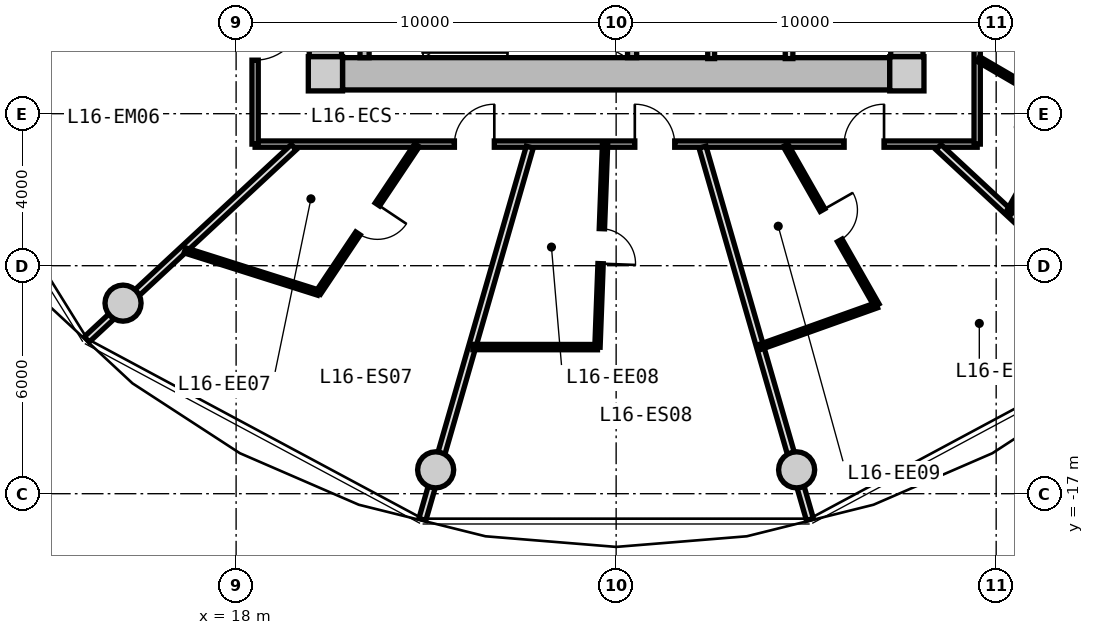
"""IFC4 building model, lengths in metres.
Left out: names, types, materials, properties, quantities, classifications, styles, units other than length and angle.
Written with IfcOpenShell. Run it as: python <this file> out.ifc"""

import sys

from ifc_helpers import new_model, si_unit, direction, frame, frame_2d, origin, origin_2d, place, context, subcontext, project, spatial, rectangle, circle, extrude, source, transform, mapped, element, fill, save


model = new_model("IFC4")
c1 = context("Model", 3, precision=1e-05, world=origin(), true_north=direction((0.0, 1.0)))
c2 = subcontext(c1, "Body", "Model", "MODEL_VIEW")
j1 = project(units=[si_unit("LENGTHUNIT", "METRE"), si_unit("PLANEANGLEUNIT", "RADIAN")], contexts=[c1])
p1 = place(None, origin())
s1 = spatial("IfcSite", under=j1, at=p1, CompositionType="ELEMENT")
p2 = place(p1, origin())
s2 = spatial("IfcBuilding", under=s1, at=p2, CompositionType="ELEMENT")
p3 = place(p2, frame((0.0, 0.0, 55.15)))
s3 = spatial("IfcBuildingStorey", under=s2, at=p3, CompositionType="ELEMENT", Elevation=55.15)
m1 = source(origin(), c2, "Body", "SweptSolid", [
    extrude(rectangle(XDim=0.9, YDim=0.9, at=origin_2d()), origin(), (0.0, 0.0, 1.0), 3.05),
])
for number, where, z_axis, x_axis in (
    (1, (20.35, -5.95, 0.0), (0.0, 0.0, 1.0), (1.0, 0.0, 0.0)),
    (2, (35.65, -5.95, 0.0), (0.0, 0.0, 1.0), (1.0, 0.0, 0.0)),
):
    element("IfcColumn", number, at=place(p3, frame(where, z_axis=z_axis, x_axis=x_axis)), inside=s3, PredefinedType="COLUMN", context=c2, shape_type="MappedRepresentation", body=[
        mapped(m1, transform((0.0, 0.0, 0.0), x_axis=(1.0, 0.0, 0.0), y_axis=(0.0, 1.0, 0.0), z_axis=(0.0, 0.0, 1.0), scale=1.0)),
    ])
m2 = source(origin(), c2, "Body", "SweptSolid", [
    extrude(rectangle(XDim=14.4, YDim=0.85, at=frame_2d((7.2, 0.0))), origin(), (0.0, 0.0, 1.0), 2.79),
])
p4 = place(p3, frame((35.2, -5.95, 0.0), z_axis=(0.0, 0.0, 1.0), x_axis=(-1.0, 0.0, 0.0)))
e3 = element("IfcWall", 3, at=p4, inside=s3, PredefinedType="SHEAR", context=c2, shape_type="MappedRepresentation", body=[
    mapped(m2, transform((0.0, 0.0, 0.0), x_axis=(1.0, 0.0, 0.0), y_axis=(0.0, 1.0, 0.0), z_axis=(0.0, 0.0, 1.0), scale=1.0)),
])
m3 = source(origin(), c2, "Body", "SweptSolid", [
    extrude(rectangle(XDim=11.0, YDim=0.85, at=frame_2d((5.5, 0.0))), origin(), (0.0, 0.0, 1.0), 2.79),
])
p5 = place(p3, frame((20.35, -5.5, 0.0), z_axis=(0.0, 0.0, 1.0), x_axis=(0.0, 1.0, 0.0)))
e4 = element("IfcWall", 4, at=p5, inside=s3, PredefinedType="SHEAR", context=c2, shape_type="MappedRepresentation", body=[
    mapped(m3, transform((0.0, 0.0, 0.0), x_axis=(1.0, 0.0, 0.0), y_axis=(0.0, 1.0, 0.0), z_axis=(0.0, 0.0, 1.0), scale=1.0)),
])
p6 = place(p5, frame((3.8, 0.0, 0.0)))
e5 = element("IfcOpeningElement", 5, at=p6, cuts=e4, PredefinedType="OPENING", context=c2, shape_type="SweptSolid", body=[
    extrude(rectangle(XDim=1.2, YDim=2.15, at=frame_2d((0.6, 1.075))), frame((0.0, 0.435, 0.0), z_axis=(0.0, -1.0, 0.0), x_axis=(1.0, 0.0, 0.0)), (0.0, 0.0, 1.0), 0.87),
])
p7 = place(p3, frame((35.65, 5.5, 0.0), z_axis=(0.0, 0.0, 1.0), x_axis=(0.0, -1.0, 0.0)))
e6 = element("IfcWall", 6, at=p7, inside=s3, PredefinedType="SHEAR", context=c2, shape_type="MappedRepresentation", body=[
    mapped(m3, transform((0.0, 0.0, 0.0), x_axis=(1.0, 0.0, 0.0), y_axis=(0.0, 1.0, 0.0), z_axis=(0.0, 0.0, 1.0), scale=1.0)),
])
p8 = place(p7, frame((5.65, 0.0, 0.0)))
e7 = element("IfcOpeningElement", 7, at=p8, cuts=e6, PredefinedType="OPENING", context=c2, shape_type="SweptSolid", body=[
    extrude(rectangle(XDim=1.2, YDim=2.15, at=frame_2d((0.6, 1.075))), frame((0.0, 0.435, 0.0), z_axis=(0.0, -1.0, 0.0), x_axis=(1.0, 0.0, 0.0)), (0.0, 0.0, 1.0), 0.87),
])
p9 = place(p7, frame((9.3, 0.0, 0.0)))
e8 = element("IfcOpeningElement", 8, at=p9, cuts=e6, PredefinedType="OPENING", context=c2, shape_type="SweptSolid", body=[
    extrude(rectangle(XDim=1.0, YDim=2.1, at=frame_2d((0.5, 1.05))), frame((0.0, 0.435, 0.0), z_axis=(0.0, -1.0, 0.0), x_axis=(1.0, 0.0, 0.0)), (0.0, 0.0, 1.0), 0.87),
])
m4 = source(origin(), c2, "Body", "SweptSolid", [
    extrude(circle(Radius=0.475, at=origin_2d()), origin(), (0.0, 0.0, 1.0), 3.05),
])
for number, where, z_axis, x_axis in (
    (9, (15.025, -11.985, 0.0), (0.0, 0.0, 1.0), (1.0, 0.0, 0.0)),
    (10, (23.251, -16.373, 0.0), (0.0, 0.0, 1.0), (1.0, 0.0, 0.0)),
    (11, (32.749, -16.373, 0.0), (0.0, 0.0, 1.0), (1.0, 0.0, 0.0)),
):
    element("IfcColumn", number, at=place(p3, frame(where, z_axis=z_axis, x_axis=x_axis)), inside=s3, PredefinedType="COLUMN", context=c2, shape_type="MappedRepresentation", body=[
        mapped(m4, transform((0.0, 0.0, 0.0), x_axis=(1.0, 0.0, 0.0), y_axis=(0.0, 1.0, 0.0), z_axis=(0.0, 0.0, 1.0), scale=1.0)),
    ])
m5 = source(origin(), c2, "Body", "SweptSolid", [
    extrude(rectangle(XDim=3.075, YDim=0.24, at=frame_2d((1.538, 0.0))), origin(), (0.0, 0.0, 1.0), 2.79),
])
for number, where, z_axis, x_axis in (
    (12, (21.38, -5.525, 0.0), (0.0, 0.0, 1.0), (0.0, 1.0, 0.0)),
    (13, (28.42, -5.525, 0.0), (0.0, 0.0, 1.0), (0.0, 1.0, 0.0)),
):
    element("IfcWall", number, at=place(p3, frame(where, z_axis=z_axis, x_axis=x_axis)), inside=s3, PredefinedType="PARTITIONING", context=c2, shape_type="MappedRepresentation", body=[
        mapped(m5, transform((0.0, 0.0, 0.0), x_axis=(1.0, 0.0, 0.0), y_axis=(0.0, 1.0, 0.0), z_axis=(0.0, 0.0, 1.0), scale=1.0)),
    ])
m6 = source(origin(), c2, "Body", "SweptSolid", [
    extrude(rectangle(XDim=3.8, YDim=0.2, at=frame_2d((1.9, 0.0))), origin(), (0.0, 0.0, 1.0), 2.775),
])
p10 = place(p3, frame((32.55, -5.55, 0.0), z_axis=(0.0, 0.0, 1.0), x_axis=(0.0, 1.0, 0.0)))
e14 = element("IfcWall", 14, at=p10, inside=s3, PredefinedType="PARTITIONING", context=c2, shape_type="MappedRepresentation", body=[
    mapped(m6, transform((0.0, 0.0, 0.0), x_axis=(1.0, 0.0, 0.0), y_axis=(0.0, 1.0, 0.0), z_axis=(0.0, 0.0, 1.0), scale=1.0)),
])
m7 = source(origin(), c2, "Body", "SweptSolid", [
    extrude(rectangle(XDim=3.22, YDim=0.18, at=frame_2d((1.61, 0.0))), origin(), (0.0, 0.0, 1.0), 2.775),
])
p11 = place(p3, frame((30.5, -5.55, 0.0), z_axis=(0.0, 0.0, 1.0), x_axis=(0.0, 1.0, 0.0)))
e15 = element("IfcWall", 15, at=p11, inside=s3, PredefinedType="PARTITIONING", context=c2, shape_type="MappedRepresentation", body=[
    mapped(m7, transform((0.0, 0.0, 0.0), x_axis=(1.0, 0.0, 0.0), y_axis=(0.0, 1.0, 0.0), z_axis=(0.0, 0.0, 1.0), scale=1.0)),
])
m8 = source(origin(), c2, "Body", "SweptSolid", [
    extrude(rectangle(XDim=19.0, YDim=0.165, at=frame_2d((9.5, 0.0))), origin(), (0.0, 0.0, 1.0), 2.775),
])
p12 = place(p3, frame((37.5, -7.8, 0.0), z_axis=(0.0, 0.0, 1.0), x_axis=(-1.0, 0.0, 0.0)))
e16 = element("IfcWall", 16, at=p12, inside=s3, PredefinedType="PARTITIONING", context=c2, shape_type="MappedRepresentation", body=[
    mapped(m8, transform((0.0, 0.0, 0.0), x_axis=(1.0, 0.0, 0.0), y_axis=(0.0, 1.0, 0.0), z_axis=(0.0, 0.0, 1.0), scale=1.0)),
])
p13 = place(p12, frame((12.706, 0.0, 0.0)))
e17 = element("IfcOpeningElement", 17, at=p13, cuts=e16, PredefinedType="OPENING", context=c2, shape_type="SweptSolid", body=[
    extrude(rectangle(XDim=1.05, YDim=2.15, at=frame_2d((0.525, 1.075))), frame((0.0, 0.093, 0.0), z_axis=(0.0, -1.0, 0.0), x_axis=(1.0, 0.0, 0.0)), (0.0, 0.0, 1.0), 0.185),
])
p14 = place(p12, frame((7.959, 0.0, 0.0)))
e18 = element("IfcOpeningElement", 18, at=p14, cuts=e16, PredefinedType="OPENING", context=c2, shape_type="SweptSolid", body=[
    extrude(rectangle(XDim=1.05, YDim=2.15, at=frame_2d((0.525, 1.075))), frame((0.0, 0.093, 0.0), z_axis=(0.0, -1.0, 0.0), x_axis=(1.0, 0.0, 0.0)), (0.0, 0.0, 1.0), 0.185),
])
p15 = place(p12, frame((2.451, 0.0, 0.0)))
e19 = element("IfcOpeningElement", 19, at=p15, cuts=e16, PredefinedType="OPENING", context=c2, shape_type="SweptSolid", body=[
    extrude(rectangle(XDim=1.05, YDim=2.15, at=frame_2d((0.525, 1.075))), frame((0.0, 0.093, 0.0), z_axis=(0.0, -1.0, 0.0), x_axis=(1.0, 0.0, 0.0)), (0.0, 0.0, 1.0), 0.185),
])
m9 = source(origin(), c2, "Body", "SweptSolid", [
    extrude(rectangle(XDim=15.6, YDim=0.165, at=frame_2d((7.8, 0.0))), origin(), (0.0, 0.0, 1.0), 2.775),
])
p16 = place(p3, frame((18.5, -7.8, 0.0), z_axis=(0.0, 0.0, 1.0), x_axis=(0.0, 1.0, 0.0)))
e20 = element("IfcWall", 20, at=p16, inside=s3, PredefinedType="PARTITIONING", context=c2, shape_type="MappedRepresentation", body=[
    mapped(m9, transform((0.0, 0.0, 0.0), x_axis=(1.0, 0.0, 0.0), y_axis=(0.0, 1.0, 0.0), z_axis=(0.0, 0.0, 1.0), scale=1.0)),
])
p17 = place(p16, frame((12.141, 0.0, 0.0)))
e21 = element("IfcOpeningElement", 21, at=p17, cuts=e20, PredefinedType="OPENING", context=c2, shape_type="SweptSolid", body=[
    extrude(rectangle(XDim=1.25, YDim=2.2, at=frame_2d((0.625, 1.1))), frame((0.0, 0.093, 0.0), z_axis=(0.0, -1.0, 0.0), x_axis=(1.0, 0.0, 0.0)), (0.0, 0.0, 1.0), 0.185),
])
p18 = place(p16, frame((7.175, 0.0, 0.0)))
e22 = element("IfcOpeningElement", 22, at=p18, cuts=e20, PredefinedType="OPENING", context=c2, shape_type="SweptSolid", body=[
    extrude(rectangle(XDim=1.25, YDim=2.2, at=frame_2d((0.625, 1.1))), frame((0.0, 0.093, 0.0), z_axis=(0.0, -1.0, 0.0), x_axis=(1.0, 0.0, 0.0)), (0.0, 0.0, 1.0), 0.185),
])
p19 = place(p16, frame((2.208, 0.0, 0.0)))
e23 = element("IfcOpeningElement", 23, at=p19, cuts=e20, PredefinedType="OPENING", context=c2, shape_type="SweptSolid", body=[
    extrude(rectangle(XDim=1.25, YDim=2.2, at=frame_2d((0.625, 1.1))), frame((0.0, 0.093, 0.0), z_axis=(0.0, -1.0, 0.0), x_axis=(1.0, 0.0, 0.0)), (0.0, 0.0, 1.0), 0.185),
])
p20 = place(p3, frame((37.5, 7.8, 0.0), z_axis=(0.0, 0.0, 1.0), x_axis=(0.0, -1.0, 0.0)))
e24 = element("IfcWall", 24, at=p20, inside=s3, PredefinedType="PARTITIONING", context=c2, shape_type="MappedRepresentation", body=[
    mapped(m9, transform((0.0, 0.0, 0.0), x_axis=(1.0, 0.0, 0.0), y_axis=(0.0, 1.0, 0.0), z_axis=(0.0, 0.0, 1.0), scale=1.0)),
])
p21 = place(p20, frame((8.835, 0.0, 0.0)))
e25 = element("IfcOpeningElement", 25, at=p21, cuts=e24, PredefinedType="OPENING", context=c2, shape_type="SweptSolid", body=[
    extrude(rectangle(XDim=1.05, YDim=2.15, at=frame_2d((0.525, 1.075))), frame((0.0, 0.093, 0.0), z_axis=(0.0, -1.0, 0.0), x_axis=(1.0, 0.0, 0.0)), (0.0, 0.0, 1.0), 0.185),
])
p22 = place(p20, frame((2.208, 0.0, 0.0)))
e26 = element("IfcOpeningElement", 26, at=p22, cuts=e24, PredefinedType="OPENING", context=c2, shape_type="SweptSolid", body=[
    extrude(rectangle(XDim=1.25, YDim=2.2, at=frame_2d((0.625, 1.1))), frame((0.0, 0.093, 0.0), z_axis=(0.0, -1.0, 0.0), x_axis=(1.0, 0.0, 0.0)), (0.0, 0.0, 1.0), 0.185),
])
m10 = source(origin(), c2, "Body", "SweptSolid", [
    extrude(rectangle(XDim=7.435, YDim=0.19, at=frame_2d((3.717, 0.0))), origin(), (0.0, 0.0, 1.0), 2.225),
])
p23 = place(p3, frame((19.517, -7.88, 0.0), z_axis=(0.0, 0.0, 1.0), x_axis=(-0.732651956848, -0.680603489652, 0.0)))
e27 = element("IfcWall", 27, at=p23, inside=s3, PredefinedType="PARTITIONING", context=c2, shape_type="MappedRepresentation", body=[
    mapped(m10, transform((0.0, 0.0, 0.0), x_axis=(1.0, 0.0, 0.0), y_axis=(0.0, 1.0, 0.0), z_axis=(0.0, 0.0, 1.0), scale=1.0)),
])
m11 = source(origin(), c2, "Body", "SweptSolid", [
    extrude(rectangle(XDim=10.196, YDim=0.19, at=frame_2d((5.098, 0.0))), origin(), (0.0, 0.0, 1.0), 2.225),
])
p24 = place(p3, frame((25.727, -7.88, 0.0), z_axis=(0.0, 0.0, 1.0), x_axis=(-0.277136420347, -0.960830580549, 0.0)))
e28 = element("IfcWall", 28, at=p24, inside=s3, PredefinedType="PARTITIONING", context=c2, shape_type="MappedRepresentation", body=[
    mapped(m11, transform((0.0, 0.0, 0.0), x_axis=(1.0, 0.0, 0.0), y_axis=(0.0, 1.0, 0.0), z_axis=(0.0, 0.0, 1.0), scale=1.0)),
])
m12 = source(origin(), c2, "Body", "SweptSolid", [
    extrude(rectangle(XDim=4.668, YDim=0.14, at=frame_2d((2.334, 0.0))), origin(), (0.0, 0.0, 1.0), 2.775),
])
p25 = place(p3, frame((22.76, -7.83, 0.0), z_axis=(0.0, 0.0, 1.0), x_axis=(-0.55615986029, -0.83107533341, 0.0)))
e29 = element("IfcWall", 29, at=p25, inside=s3, PredefinedType="PARTITIONING", context=c2, shape_type="MappedRepresentation", body=[
    mapped(m12, transform((0.0, 0.0, 0.0), x_axis=(1.0, 0.0, 0.0), y_axis=(0.0, 1.0, 0.0), z_axis=(0.0, 0.0, 1.0), scale=1.0)),
])
p26 = place(p25, frame((1.874, 0.0, 0.0)))
e30 = element("IfcOpeningElement", 30, at=p26, cuts=e29, PredefinedType="OPENING", context=c2, shape_type="SweptSolid", body=[
    extrude(rectangle(XDim=0.92, YDim=2.1, at=frame_2d((0.46, 1.05))), frame((0.0, 0.08, 0.0), z_axis=(0.0, -1.0, 0.0), x_axis=(1.0, 0.0, 0.0)), (0.0, 0.0, 1.0), 0.16),
])
m13 = source(origin(), c2, "Body", "SweptSolid", [
    extrude(rectangle(XDim=3.684, YDim=0.14, at=frame_2d((1.842, 0.0))), origin(), (0.0, 0.0, 1.0), 2.775),
])
p27 = place(p3, frame((20.164, -11.709, 0.0), z_axis=(0.0, 0.0, 1.0), x_axis=(-0.953245538614, 0.302196861518, 0.0)))
e31 = element("IfcWall", 31, at=p27, inside=s3, PredefinedType="PARTITIONING", context=c2, shape_type="MappedRepresentation", body=[
    mapped(m13, transform((0.0, 0.0, 0.0), x_axis=(1.0, 0.0, 0.0), y_axis=(0.0, 1.0, 0.0), z_axis=(0.0, 0.0, 1.0), scale=1.0)),
])
p28 = place(p3, frame((30.273, -7.88, 0.0), z_axis=(0.0, 0.0, 1.0), x_axis=(0.277136420347, -0.960830580549, 0.0)))
e32 = element("IfcWall", 32, at=p28, inside=s3, PredefinedType="PARTITIONING", context=c2, shape_type="MappedRepresentation", body=[
    mapped(m11, transform((0.0, 0.0, 0.0), x_axis=(1.0, 0.0, 0.0), y_axis=(0.0, 1.0, 0.0), z_axis=(0.0, 0.0, 1.0), scale=1.0)),
])
m14 = source(origin(), c2, "Body", "SweptSolid", [
    extrude(rectangle(XDim=5.316, YDim=0.14, at=frame_2d((2.658, 0.0))), origin(), (0.0, 0.0, 1.0), 2.775),
])
p29 = place(p3, frame((27.707, -7.83, 0.0), z_axis=(0.0, 0.0, 1.0), x_axis=(-0.037380226447, -0.999301115115, 0.0)))
e33 = element("IfcWall", 33, at=p29, inside=s3, PredefinedType="PARTITIONING", context=c2, shape_type="MappedRepresentation", body=[
    mapped(m14, transform((0.0, 0.0, 0.0), x_axis=(1.0, 0.0, 0.0), y_axis=(0.0, 1.0, 0.0), z_axis=(0.0, 0.0, 1.0), scale=1.0)),
])
p30 = place(p29, frame((2.198, 0.0, 0.0)))
e34 = element("IfcOpeningElement", 34, at=p30, cuts=e33, PredefinedType="OPENING", context=c2, shape_type="SweptSolid", body=[
    extrude(rectangle(XDim=0.92, YDim=2.1, at=frame_2d((0.46, 1.05))), frame((0.0, 0.08, 0.0), z_axis=(0.0, -1.0, 0.0), x_axis=(1.0, 0.0, 0.0)), (0.0, 0.0, 1.0), 0.16),
])
m15 = source(origin(), c2, "Body", "SweptSolid", [
    extrude(rectangle(XDim=3.279, YDim=0.14, at=frame_2d((1.64, 0.0))), origin(), (0.0, 0.0, 1.0), 2.775),
])
p31 = place(p3, frame((27.509, -13.143, 0.0), z_axis=(0.0, 0.0, 1.0), x_axis=(-0.999999664619, 0.000819000544, 0.0)))
e35 = element("IfcWall", 35, at=p31, inside=s3, PredefinedType="PARTITIONING", context=c2, shape_type="MappedRepresentation", body=[
    mapped(m15, transform((0.0, 0.0, 0.0), x_axis=(1.0, 0.0, 0.0), y_axis=(0.0, 1.0, 0.0), z_axis=(0.0, 0.0, 1.0), scale=1.0)),
])
p32 = place(p3, frame((36.483, -7.88, 0.0), z_axis=(0.0, 0.0, 1.0), x_axis=(0.732651956848, -0.680603489652, 0.0)))
e36 = element("IfcWall", 36, at=p32, inside=s3, PredefinedType="PARTITIONING", context=c2, shape_type="MappedRepresentation", body=[
    mapped(m10, transform((0.0, 0.0, 0.0), x_axis=(1.0, 0.0, 0.0), y_axis=(0.0, 1.0, 0.0), z_axis=(0.0, 0.0, 1.0), scale=1.0)),
])
m16 = source(origin(), c2, "Body", "SweptSolid", [
    extrude(rectangle(XDim=4.846, YDim=0.14, at=frame_2d((2.423, 0.0))), origin(), (0.0, 0.0, 1.0), 2.775),
])
p33 = place(p3, frame((32.458, -7.83, 0.0), z_axis=(0.0, 0.0, 1.0), x_axis=(0.494841788743, -0.868983086207, 0.0)))
e37 = element("IfcWall", 37, at=p33, inside=s3, PredefinedType="PARTITIONING", context=c2, shape_type="MappedRepresentation", body=[
    mapped(m16, transform((0.0, 0.0, 0.0), x_axis=(1.0, 0.0, 0.0), y_axis=(0.0, 1.0, 0.0), z_axis=(0.0, 0.0, 1.0), scale=1.0)),
])
p34 = place(p33, frame((1.963, 0.0, 0.0)))
e38 = element("IfcOpeningElement", 38, at=p34, cuts=e37, PredefinedType="OPENING", context=c2, shape_type="SweptSolid", body=[
    extrude(rectangle(XDim=0.92, YDim=2.1, at=frame_2d((0.46, 1.05))), frame((0.0, 0.08, 0.0), z_axis=(0.0, -1.0, 0.0), x_axis=(1.0, 0.0, 0.0)), (0.0, 0.0, 1.0), 0.16),
])
m17 = source(origin(), c2, "Body", "SweptSolid", [
    extrude(rectangle(XDim=3.276, YDim=0.14, at=frame_2d((1.638, 0.0))), origin(), (0.0, 0.0, 1.0), 2.415),
])
p35 = place(p3, frame((34.857, -12.042, 0.0), z_axis=(0.0, 0.0, 1.0), x_axis=(-0.94174696961, -0.336322234221, 0.0)))
e39 = element("IfcWall", 39, at=p35, inside=s3, PredefinedType="PARTITIONING", context=c2, shape_type="MappedRepresentation", body=[
    mapped(m17, transform((0.0, 0.0, 0.0), x_axis=(1.0, 0.0, 0.0), y_axis=(0.0, 1.0, 0.0), z_axis=(0.0, 0.0, 1.0), scale=1.0)),
])
m18 = source(origin(), c2, "Body", "SweptSolid", [
    extrude(rectangle(XDim=2.669, YDim=0.14, at=frame_2d((1.335, 0.0))), origin(), (0.0, 0.0, 1.0), 2.775),
])
p36 = place(p3, frame((37.53, -5.561, 0.0), z_axis=(0.0, 0.0, 1.0), x_axis=(0.86369928178, -0.50400749067, 0.0)))
e40 = element("IfcWall", 40, at=p36, inside=s3, PredefinedType="PARTITIONING", context=c2, shape_type="MappedRepresentation", body=[
    mapped(m18, transform((0.0, 0.0, 0.0), x_axis=(1.0, 0.0, 0.0), y_axis=(0.0, 1.0, 0.0), z_axis=(0.0, 0.0, 1.0), scale=1.0)),
])
m19 = source(origin(), c2, "Body", "SweptSolid", [
    extrude(rectangle(XDim=3.121, YDim=0.14, at=frame_2d((1.561, 0.0))), origin(), (0.0, 0.0, 1.0), 2.775),
])
p37 = place(p3, frame((39.836, -6.906, 0.0), z_axis=(0.0, 0.0, 1.0), x_axis=(-0.487302357327, -0.873233309342, 0.0)))
e41 = element("IfcWall", 41, at=p37, inside=s3, PredefinedType="PARTITIONING", context=c2, shape_type="MappedRepresentation", body=[
    mapped(m19, transform((0.0, 0.0, 0.0), x_axis=(1.0, 0.0, 0.0), y_axis=(0.0, 1.0, 0.0), z_axis=(0.0, 0.0, 1.0), scale=1.0)),
])
p38 = place(p37, frame((1.101, 0.0, 0.0)))
e42 = element("IfcOpeningElement", 42, at=p38, cuts=e41, PredefinedType="OPENING", context=c2, shape_type="SweptSolid", body=[
    extrude(rectangle(XDim=0.92, YDim=2.1, at=frame_2d((0.46, 1.05))), frame((0.0, 0.08, 0.0), z_axis=(0.0, -1.0, 0.0), x_axis=(1.0, 0.0, 0.0)), (0.0, 0.0, 1.0), 0.16),
])
m20 = source(origin(), c2, "Body", "SweptSolid", [
    extrude(rectangle(XDim=1.25, YDim=2.2, at=frame_2d((0.625, 1.1))), frame((0.0, 0.025, 0.0), z_axis=(0.0, -1.0, 0.0), x_axis=(1.0, 0.0, 0.0)), (0.0, 0.0, 1.0), 0.05),
])
p39 = place(p19, frame((1.25, 0.0, 0.0), z_axis=(0.0, 0.0, 1.0), x_axis=(-1.0, 0.0, 0.0)))
e43 = element("IfcDoor", 43, at=p39, inside=s3, OperationType="SINGLE_SWING_LEFT", PredefinedType="DOOR", context=c2, shape_type="MappedRepresentation", body=[
    mapped(m20, transform((0.0, 0.0, 0.0), x_axis=(1.0, 0.0, 0.0), y_axis=(0.0, 1.0, 0.0), z_axis=(0.0, 0.0, 1.0), scale=1.0)),
])
fill(e23, e43)
m21 = source(origin(), c2, "Body", "SweptSolid", [
    extrude(rectangle(XDim=1.05, YDim=2.15, at=frame_2d((0.525, 1.075))), frame((0.0, 0.025, 0.0), z_axis=(0.0, -1.0, 0.0), x_axis=(1.0, 0.0, 0.0)), (0.0, 0.0, 1.0), 0.05),
])
p40 = place(p13, frame((1.05, 0.0, 0.0), z_axis=(0.0, 0.0, 1.0), x_axis=(-1.0, 0.0, 0.0)))
e44 = element("IfcDoor", 44, at=p40, inside=s3, OperationType="SINGLE_SWING_RIGHT", PredefinedType="DOOR", context=c2, shape_type="MappedRepresentation", body=[
    mapped(m21, transform((0.0, 0.0, 0.0), x_axis=(1.0, 0.0, 0.0), y_axis=(0.0, 1.0, 0.0), z_axis=(0.0, 0.0, 1.0), scale=1.0)),
])
fill(e17, e44)
m22 = source(origin(), c2, "Body", "SweptSolid", [
    extrude(rectangle(XDim=0.92, YDim=2.1, at=frame_2d((0.46, 1.05))), frame((0.0, 0.025, 0.0), z_axis=(0.0, -1.0, 0.0), x_axis=(1.0, 0.0, 0.0)), (0.0, 0.0, 1.0), 0.05),
])
p41 = place(p26, origin())
e45 = element("IfcDoor", 45, at=p41, inside=s3, OperationType="SINGLE_SWING_LEFT", PredefinedType="DOOR", context=c2, shape_type="MappedRepresentation", body=[
    mapped(m22, transform((0.0, 0.0, 0.0), x_axis=(1.0, 0.0, 0.0), y_axis=(0.0, 1.0, 0.0), z_axis=(0.0, 0.0, 1.0), scale=1.0)),
])
fill(e30, e45)
p42 = place(p14, frame((1.05, 0.0, 0.0), z_axis=(0.0, 0.0, 1.0), x_axis=(-1.0, 0.0, 0.0)))
e46 = element("IfcDoor", 46, at=p42, inside=s3, OperationType="SINGLE_SWING_LEFT", PredefinedType="DOOR", context=c2, shape_type="MappedRepresentation", body=[
    mapped(m21, transform((0.0, 0.0, 0.0), x_axis=(1.0, 0.0, 0.0), y_axis=(0.0, 1.0, 0.0), z_axis=(0.0, 0.0, 1.0), scale=1.0)),
])
fill(e18, e46)
p43 = place(p30, origin())
e47 = element("IfcDoor", 47, at=p43, inside=s3, OperationType="SINGLE_SWING_RIGHT", PredefinedType="DOOR", context=c2, shape_type="MappedRepresentation", body=[
    mapped(m22, transform((0.0, 0.0, 0.0), x_axis=(1.0, 0.0, 0.0), y_axis=(0.0, 1.0, 0.0), z_axis=(0.0, 0.0, 1.0), scale=1.0)),
])
fill(e34, e47)
p44 = place(p15, frame((1.05, 0.0, 0.0), z_axis=(0.0, 0.0, 1.0), x_axis=(-1.0, 0.0, 0.0)))
e48 = element("IfcDoor", 48, at=p44, inside=s3, OperationType="SINGLE_SWING_RIGHT", PredefinedType="DOOR", context=c2, shape_type="MappedRepresentation", body=[
    mapped(m21, transform((0.0, 0.0, 0.0), x_axis=(1.0, 0.0, 0.0), y_axis=(0.0, 1.0, 0.0), z_axis=(0.0, 0.0, 1.0), scale=1.0)),
])
fill(e19, e48)
p45 = place(p34, origin())
e49 = element("IfcDoor", 49, at=p45, inside=s3, OperationType="SINGLE_SWING_LEFT", PredefinedType="DOOR", context=c2, shape_type="MappedRepresentation", body=[
    mapped(m22, transform((0.0, 0.0, 0.0), x_axis=(1.0, 0.0, 0.0), y_axis=(0.0, 1.0, 0.0), z_axis=(0.0, 0.0, 1.0), scale=1.0)),
])
fill(e38, e49)
save(model, sys.argv[1])
